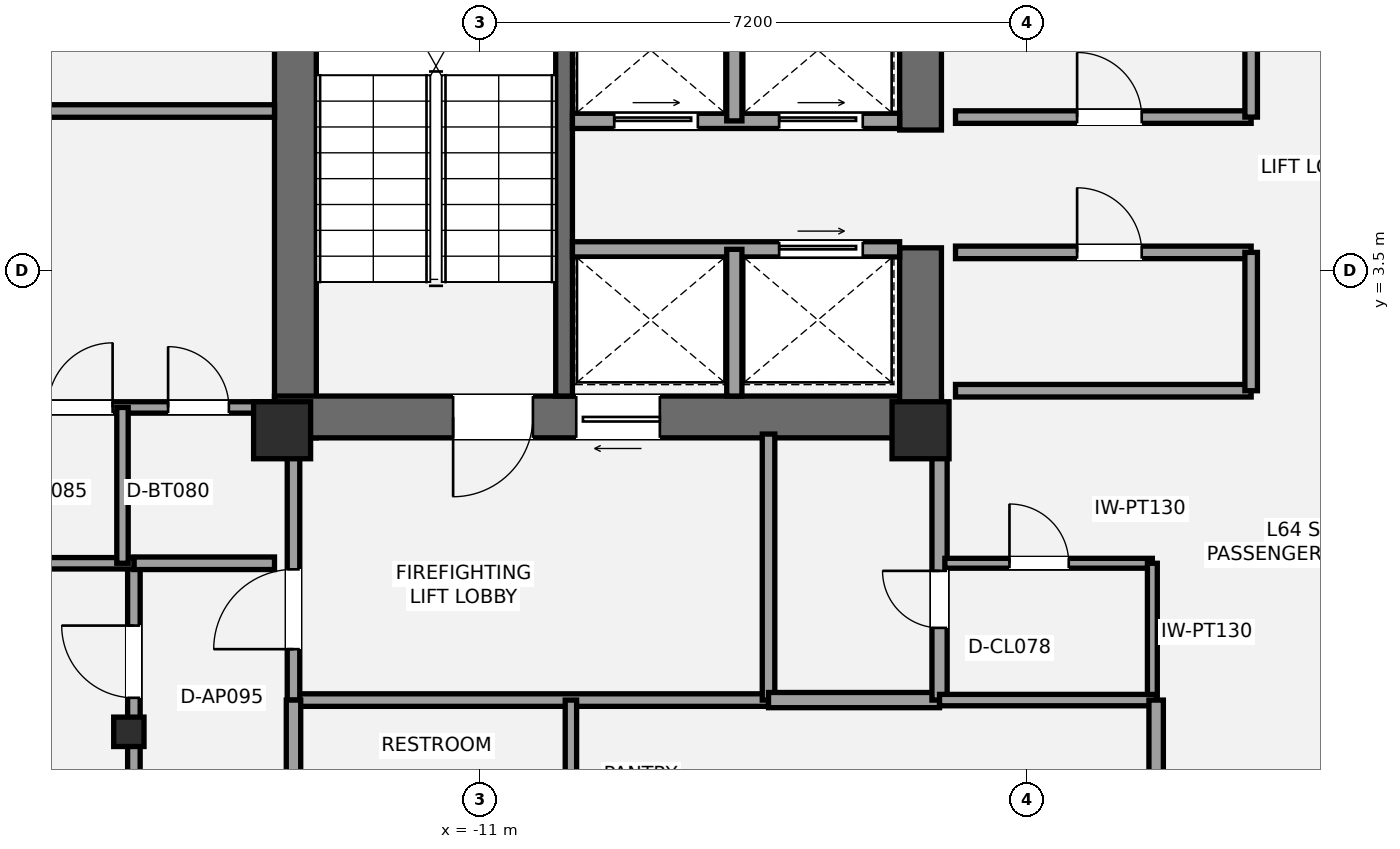
"""IFC4 building model, lengths in metres.
Left out: names, types, materials, properties, quantities, classifications, styles, units other than length and angle.
Written with IfcOpenShell. Run it as: python <this file> out.ifc"""

import sys

from ifc_helpers import new_model, si_unit, direction, frame, frame_2d, origin, origin_2d, place, context, subcontext, project, spatial, rectangle, i_section, extrude, element, fill, save


model = new_model("IFC4")
c1 = context("Model", 3, precision=1e-05, world=origin(), true_north=direction((0.0, 1.0)))
c2 = subcontext(c1, "Body", "Model", "MODEL_VIEW")
j1 = project(units=[si_unit("LENGTHUNIT", "METRE"), si_unit("PLANEANGLEUNIT", "RADIAN")], contexts=[c1])
p1 = place(None, origin())
s1 = spatial("IfcSite", under=j1, at=p1, CompositionType="ELEMENT")
p2 = place(p1, origin())
s2 = spatial("IfcBuilding", under=s1, at=p2, CompositionType="ELEMENT")
p3 = place(p2, frame((0.0, 0.0, 228.9)))
s3 = spatial("IfcBuildingStorey", under=s2, at=p3, CompositionType="ELEMENT", Elevation=228.9)
p4 = place(p3, frame((-13.425, 1.3, 0.0), z_axis=(0.0, 0.0, 1.0), x_axis=(0.0, 1.0, 0.0)))
e1 = element("IfcWall", 1, at=p4, inside=s3, PredefinedType="SHEAR", context=c2, shape_type="SweptSolid", body=[
    extrude(rectangle(XDim=8.25, YDim=0.55, at=frame_2d((4.125, 0.0))), origin(), (0.0, 0.0, 1.0), 3.15),
])
p5 = place(p3, frame((-4.925, 1.575, 0.0), z_axis=(0.0, 0.0, 1.0), x_axis=(-1.0, 0.0, 0.0)))
e2 = element("IfcWall", 2, at=p5, inside=s3, PredefinedType="SHEAR", context=c2, shape_type="SweptSolid", body=[
    extrude(rectangle(XDim=8.775, YDim=0.55, at=frame_2d((4.387, 0.0))), origin(), (0.0, 0.0, 1.0), 3.15),
])
p6 = place(p5, frame((5.375, 0.0, 0.0)))
e3 = element("IfcOpeningElement", 3, at=p6, cuts=e2, PredefinedType="OPENING", context=c2, shape_type="SweptSolid", body=[
    extrude(rectangle(XDim=1.05, YDim=2.15, at=frame_2d((0.525, 1.075))), frame((0.0, 0.285, 0.0), z_axis=(0.0, -1.0, 0.0), x_axis=(1.0, 0.0, 0.0)), (0.0, 0.0, 1.0), 0.57),
])
p7 = place(p5, frame((3.705, 0.0, 0.0)))
e4 = element("IfcOpeningElement", 4, at=p7, cuts=e2, PredefinedType="OPENING", context=c2, shape_type="SweptSolid", body=[
    extrude(rectangle(XDim=1.1, YDim=2.2, at=frame_2d((0.55, 1.1))), frame((0.0, 0.285, 0.0), z_axis=(0.0, -1.0, 0.0), x_axis=(1.0, 0.0, 0.0)), (0.0, 0.0, 1.0), 0.57),
])
p8 = place(p3, frame((-5.2, 1.3, 0.0), z_axis=(0.0, 0.0, 1.0), x_axis=(0.0, 1.0, 0.0)))
e5 = element("IfcWall", 5, at=p8, inside=s3, PredefinedType="SHEAR", context=c2, shape_type="SweptSolid", body=[
    extrude(rectangle(XDim=2.5, YDim=0.55, at=frame_2d((1.25, 0.0))), origin(), (0.0, 0.0, 1.0), 3.15),
])
p9 = place(p3, frame((-5.2, 5.35, 0.0), z_axis=(0.0, 0.0, 1.0), x_axis=(0.0, 1.0, 0.0)))
e6 = element("IfcWall", 6, at=p9, inside=s3, PredefinedType="SHEAR", context=c2, shape_type="SweptSolid", body=[
    extrude(rectangle(XDim=2.0, YDim=0.55, at=frame_2d((1.0, 0.0))), origin(), (0.0, 0.0, 1.0), 3.15),
])
p10 = place(p3, frame((-9.89, 1.85, 0.0), z_axis=(0.0, 0.0, 1.0), x_axis=(0.0, 1.0, 0.0)))
e7 = element("IfcWall", 7, at=p10, inside=s3, PredefinedType="SHEAR", context=c2, shape_type="SweptSolid", body=[
    extrude(rectangle(XDim=7.15, YDim=0.22, at=frame_2d((3.575, 0.0))), origin(), (0.0, 0.0, 1.0), 3.15),
])
for number, where, z_axis, x_axis in (
    (8, (-13.6, 1.4, 0.0), (0.0, 0.0, 1.0), (1.0, 0.0, 0.0)),
    (9, (-5.2, 1.4, 0.0), (0.0, 0.0, 1.0), (1.0, 0.0, 0.0)),
):
    element("IfcColumn", number, at=place(p3, frame(where, z_axis=z_axis, x_axis=x_axis)), inside=s3, PredefinedType="PILASTER", context=c2, shape_type="SweptSolid", body=[
        extrude(rectangle(XDim=0.75, YDim=0.75, at=origin_2d()), origin(), (0.0, 0.0, 1.0), 3.15),
    ])
p11 = place(p3, frame((-15.616, -2.567, 0.0), z_axis=(0.0, 0.0, 1.0), x_axis=(1.0, 0.0, 0.0)))
e10 = element("IfcColumn", 10, at=p11, inside=s3, PredefinedType="COLUMN", context=c2, shape_type="SweptSolid", body=[
    extrude(i_section(OverallWidth=0.399, OverallDepth=0.387, WebThickness=0.021, FlangeThickness=0.033, at=origin_2d()), origin(), (0.0, 0.0, 1.0), 3.15),
])
p12 = place(p3, frame((-13.45, -2.15, 0.0), z_axis=(0.0, 0.0, 1.0), x_axis=(1.0, 0.0, 0.0)))
e11 = element("IfcWall", 11, at=p12, inside=s3, PredefinedType="PARTITIONING", context=c2, shape_type="SweptSolid", body=[
    extrude(rectangle(XDim=6.25, YDim=0.165, at=frame_2d((3.125, 0.0))), origin(), (0.0, 0.0, 1.0), 2.423),
])
p13 = place(p3, frame((-13.45, -2.15, 0.0), z_axis=(0.0, 0.0, 1.0), x_axis=(0.0, 1.0, 0.0)))
e12 = element("IfcWall", 12, at=p13, inside=s3, PredefinedType="PARTITIONING", context=c2, shape_type="SweptSolid", body=[
    extrude(rectangle(XDim=3.5, YDim=0.165, at=frame_2d((1.75, 0.0))), origin(), (0.0, 0.0, 1.0), 2.423),
])
p14 = place(p13, frame((0.67, 0.0, 0.0)))
e13 = element("IfcOpeningElement", 13, at=p14, cuts=e12, PredefinedType="OPENING", context=c2, shape_type="SweptSolid", body=[
    extrude(rectangle(XDim=1.05, YDim=2.15, at=frame_2d((0.525, 1.075))), frame((0.0, 0.093, 0.0), z_axis=(0.0, -1.0, 0.0), x_axis=(1.0, 0.0, 0.0)), (0.0, 0.0, 1.0), 0.185),
])
p15 = place(p3, frame((-7.2, -2.15, 0.0), z_axis=(0.0, 0.0, 1.0), x_axis=(0.0, 1.0, 0.0)))
e14 = element("IfcWall", 14, at=p15, inside=s3, PredefinedType="PARTITIONING", context=c2, shape_type="SweptSolid", body=[
    extrude(rectangle(XDim=3.5, YDim=0.165, at=frame_2d((1.75, 0.0))), origin(), (0.0, 0.0, 1.0), 2.423),
])
p16 = place(p3, frame((-7.2, -2.15, 0.0), z_axis=(0.0, 0.0, 1.0), x_axis=(1.0, 0.0, 0.0)))
e15 = element("IfcWall", 15, at=p16, inside=s3, PredefinedType="SOLIDWALL", context=c2, shape_type="SweptSolid", body=[
    extrude(rectangle(XDim=2.25, YDim=0.2, at=frame_2d((1.125, 0.0))), origin(), (0.0, 0.0, 1.0), 2.97),
])
p17 = place(p3, frame((-4.95, -2.15, 0.0), z_axis=(0.0, 0.0, 1.0), x_axis=(0.0, 1.0, 0.0)))
e16 = element("IfcWall", 16, at=p17, inside=s3, PredefinedType="SOLIDWALL", context=c2, shape_type="SweptSolid", body=[
    extrude(rectangle(XDim=3.5, YDim=0.2, at=frame_2d((1.75, 0.0))), origin(), (0.0, 0.0, 1.0), 2.423),
])
p18 = place(p17, frame((0.95, 0.0, 0.0)))
e17 = element("IfcOpeningElement", 17, at=p18, cuts=e16, PredefinedType="OPENING", context=c2, shape_type="SweptSolid", body=[
    extrude(rectangle(XDim=0.75, YDim=2.1, at=frame_2d((0.375, 1.05))), frame((0.0, 0.11, 0.0), z_axis=(0.0, -1.0, 0.0), x_axis=(1.0, 0.0, 0.0)), (0.0, 0.0, 1.0), 0.22),
])
p19 = place(p3, frame((-4.88, -0.35, 0.0), z_axis=(0.0, 0.0, 1.0), x_axis=(1.0, 0.0, 0.0)))
e18 = element("IfcWall", 18, at=p19, inside=s3, PredefinedType="PARTITIONING", context=c2, shape_type="SweptSolid", body=[
    extrude(rectangle(XDim=2.73, YDim=0.13, at=frame_2d((1.365, 0.0))), origin(), (0.0, 0.0, 1.0), 2.97),
])
p20 = place(p19, frame((0.85, 0.0, 0.0)))
e19 = element("IfcOpeningElement", 19, at=p20, cuts=e18, PredefinedType="OPENING", context=c2, shape_type="SweptSolid", body=[
    extrude(rectangle(XDim=0.78, YDim=2.1, at=frame_2d((0.39, 1.05))), frame((0.0, 0.075, 0.0), z_axis=(0.0, -1.0, 0.0), x_axis=(1.0, 0.0, 0.0)), (0.0, 0.0, 1.0), 0.15),
])
p21 = place(p3, frame((-2.15, -2.15, 0.0), z_axis=(0.0, 0.0, 1.0), x_axis=(0.0, 1.0, 0.0)))
e20 = element("IfcWall", 20, at=p21, inside=s3, PredefinedType="PARTITIONING", context=c2, shape_type="SweptSolid", body=[
    extrude(rectangle(XDim=1.8, YDim=0.13, at=frame_2d((0.9, 0.0))), origin(), (0.0, 0.0, 1.0), 2.97),
])
p22 = place(p3, frame((-9.78, 3.78, 0.0), z_axis=(0.0, 0.0, 1.0), x_axis=(1.0, 0.0, 0.0)))
e21 = element("IfcWall", 21, at=p22, inside=s3, PredefinedType="SOLIDWALL", context=c2, shape_type="SweptSolid", body=[
    extrude(rectangle(XDim=4.305, YDim=0.2, at=frame_2d((2.152, 0.0))), origin(), (0.0, 0.0, 1.0), 2.97),
])
p23 = place(p22, frame((2.72, 0.0, 0.0)))
e22 = element("IfcOpeningElement", 22, at=p23, cuts=e21, PredefinedType="OPENING", context=c2, shape_type="SweptSolid", body=[
    extrude(rectangle(XDim=1.1, YDim=2.2, at=frame_2d((0.55, 1.1))), frame((0.0, 0.11, 0.0), z_axis=(0.0, -1.0, 0.0), x_axis=(1.0, 0.0, 0.0)), (0.0, 0.0, 1.0), 0.22),
])
p24 = place(p3, frame((-7.65, 1.85, 0.0), z_axis=(0.0, 0.0, 1.0), x_axis=(0.0, 1.0, 0.0)))
e23 = element("IfcWall", 23, at=p24, inside=s3, PredefinedType="SOLIDWALL", context=c2, shape_type="SweptSolid", body=[
    extrude(rectangle(XDim=1.93, YDim=0.2, at=frame_2d((0.965, 0.0))), origin(), (0.0, 0.0, 1.0), 2.97),
])
p25 = place(p3, frame((-9.78, 5.47, 0.0), z_axis=(0.0, 0.0, 1.0), x_axis=(1.0, 0.0, 0.0)))
e24 = element("IfcWall", 24, at=p25, inside=s3, PredefinedType="SOLIDWALL", context=c2, shape_type="SweptSolid", body=[
    extrude(rectangle(XDim=4.305, YDim=0.2, at=frame_2d((2.152, 0.0))), origin(), (0.0, 0.0, 1.0), 2.97),
])
p26 = place(p25, frame((0.55, 0.0, 0.0)))
e25 = element("IfcOpeningElement", 25, at=p26, cuts=e24, PredefinedType="OPENING", context=c2, shape_type="SweptSolid", body=[
    extrude(rectangle(XDim=1.1, YDim=2.2, at=frame_2d((0.55, 1.1))), frame((0.0, 0.11, 0.0), z_axis=(0.0, -1.0, 0.0), x_axis=(1.0, 0.0, 0.0)), (0.0, 0.0, 1.0), 0.22),
])
p27 = place(p25, frame((2.72, 0.0, 0.0)))
e26 = element("IfcOpeningElement", 26, at=p27, cuts=e24, PredefinedType="OPENING", context=c2, shape_type="SweptSolid", body=[
    extrude(rectangle(XDim=1.1, YDim=2.2, at=frame_2d((0.55, 1.1))), frame((0.0, 0.11, 0.0), z_axis=(0.0, -1.0, 0.0), x_axis=(1.0, 0.0, 0.0)), (0.0, 0.0, 1.0), 0.22),
])
p28 = place(p3, frame((-7.65, 5.47, 0.0), z_axis=(0.0, 0.0, 1.0), x_axis=(0.0, 1.0, 0.0)))
e27 = element("IfcWall", 27, at=p28, inside=s3, PredefinedType="SOLIDWALL", context=c2, shape_type="SweptSolid", body=[
    extrude(rectangle(XDim=1.86, YDim=0.2, at=frame_2d((0.93, 0.0))), origin(), (0.0, 0.0, 1.0), 2.97),
])
p29 = place(p3, frame((-4.74, 1.92, 0.0), z_axis=(0.0, 0.0, 1.0), x_axis=(1.0, 0.0, 0.0)))
e28 = element("IfcWall", 28, at=p29, inside=s3, PredefinedType="PARTITIONING", context=c2, shape_type="SweptSolid", body=[
    extrude(rectangle(XDim=3.89, YDim=0.165, at=frame_2d((1.945, 0.0))), origin(), (0.0, 0.0, 1.0), 2.11),
])
p30 = place(p3, frame((-4.74, 3.74, 0.0), z_axis=(0.0, 0.0, 1.0), x_axis=(1.0, 0.0, 0.0)))
e29 = element("IfcWall", 29, at=p30, inside=s3, PredefinedType="PARTITIONING", context=c2, shape_type="SweptSolid", body=[
    extrude(rectangle(XDim=3.89, YDim=0.165, at=frame_2d((1.945, 0.0))), origin(), (0.0, 0.0, 1.0), 2.97),
])
p31 = place(p30, frame((1.6, 0.0, 0.0)))
e30 = element("IfcOpeningElement", 30, at=p31, cuts=e29, PredefinedType="OPENING", context=c2, shape_type="SweptSolid", body=[
    extrude(rectangle(XDim=0.85, YDim=2.1, at=frame_2d((0.425, 1.05))), frame((0.0, 0.093, 0.0), z_axis=(0.0, -1.0, 0.0), x_axis=(1.0, 0.0, 0.0)), (0.0, 0.0, 1.0), 0.185),
])
p32 = place(p3, frame((-0.85, 1.92, 0.0), z_axis=(0.0, 0.0, 1.0), x_axis=(0.0, 1.0, 0.0)))
e31 = element("IfcWall", 31, at=p32, inside=s3, PredefinedType="PARTITIONING", context=c2, shape_type="SweptSolid", body=[
    extrude(rectangle(XDim=1.82, YDim=0.165, at=frame_2d((0.91, 0.0))), origin(), (0.0, 0.0, 1.0), 2.97),
])
p33 = place(p3, frame((-4.74, 5.52, 0.0), z_axis=(0.0, 0.0, 1.0), x_axis=(1.0, 0.0, 0.0)))
e32 = element("IfcWall", 32, at=p33, inside=s3, PredefinedType="PARTITIONING", context=c2, shape_type="SweptSolid", body=[
    extrude(rectangle(XDim=3.89, YDim=0.165, at=frame_2d((1.945, 0.0))), origin(), (0.0, 0.0, 1.0), 2.97),
])
p34 = place(p33, frame((1.6, 0.0, 0.0)))
e33 = element("IfcOpeningElement", 33, at=p34, cuts=e32, PredefinedType="OPENING", context=c2, shape_type="SweptSolid", body=[
    extrude(rectangle(XDim=0.85, YDim=2.1, at=frame_2d((0.425, 1.05))), frame((0.0, 0.093, 0.0), z_axis=(0.0, -1.0, 0.0), x_axis=(1.0, 0.0, 0.0)), (0.0, 0.0, 1.0), 0.185),
])
p35 = place(p3, frame((-0.85, 5.52, 0.0), z_axis=(0.0, 0.0, 1.0), x_axis=(0.0, 1.0, 0.0)))
e34 = element("IfcWall", 34, at=p35, inside=s3, PredefinedType="PARTITIONING", context=c2, shape_type="SweptSolid", body=[
    extrude(rectangle(XDim=1.81, YDim=0.165, at=frame_2d((0.905, 0.0))), origin(), (0.0, 0.0, 1.0), 2.97),
])
p36 = place(p3, frame((-4.95, -2.15, 0.0), z_axis=(0.0, 0.0, 1.0), x_axis=(1.0, 0.0, 0.0)))
e35 = element("IfcWall", 35, at=p36, inside=s3, PredefinedType="PLUMBINGWALL", context=c2, shape_type="SweptSolid", body=[
    extrude(rectangle(XDim=2.85, YDim=0.15, at=frame_2d((1.425, 0.0))), origin(), (0.0, 0.0, 1.0), 2.423),
])
for number, where, z_axis, x_axis in (
    (36, (-13.45, -4.05, 0.0), (0.0, 0.0, 1.0), (0.0, 1.0, 0.0)),
    (37, (-2.1, -4.05, 0.0), (0.0, 0.0, 1.0), (0.0, 1.0, 0.0)),
):
    element("IfcWall", number, at=place(p3, frame(where, z_axis=z_axis, x_axis=x_axis)), inside=s3, PredefinedType="PLUMBINGWALL", context=c2, shape_type="SweptSolid", body=[
        extrude(rectangle(XDim=1.9, YDim=0.19, at=frame_2d((0.95, 0.0))), origin(), (0.0, 0.0, 1.0), 2.423),
    ])
p37 = place(p3, frame((-9.8, -4.05, 0.0), z_axis=(0.0, 0.0, 1.0), x_axis=(0.0, 1.0, 0.0)))
e38 = element("IfcWall", 38, at=p37, inside=s3, PredefinedType="PLUMBINGWALL", context=c2, shape_type="SweptSolid", body=[
    extrude(rectangle(XDim=1.9, YDim=0.15, at=frame_2d((0.95, 0.0))), origin(), (0.0, 0.0, 1.0), 2.97),
])
p38 = place(p3, frame((-15.55, -3.95, 0.0), z_axis=(0.0, 0.0, 1.0), x_axis=(0.0, 1.0, 0.0)))
e39 = element("IfcWall", 39, at=p38, inside=s3, PredefinedType="PARTITIONING", context=c2, shape_type="SweptSolid", body=[
    extrude(rectangle(XDim=3.6, YDim=0.165, at=frame_2d((1.8, 0.0))), origin(), (0.0, 0.0, 1.0), 2.357),
])
p39 = place(p38, frame((1.83, 0.0, 0.0)))
e40 = element("IfcOpeningElement", 40, at=p39, cuts=e39, PredefinedType="OPENING", context=c2, shape_type="SweptSolid", body=[
    extrude(rectangle(XDim=0.95, YDim=2.15, at=frame_2d((0.475, 1.075))), frame((0.0, 0.093, 0.0), z_axis=(0.0, -1.0, 0.0), x_axis=(1.0, 0.0, 0.0)), (0.0, 0.0, 1.0), 0.185),
])
p40 = place(p3, frame((-15.55, -0.35, 0.0), z_axis=(0.0, 0.0, 1.0), x_axis=(1.0, 0.0, 0.0)))
e41 = element("IfcWall", 41, at=p40, inside=s3, PredefinedType="PARTITIONING", context=c2, shape_type="SweptSolid", body=[
    extrude(rectangle(XDim=1.85, YDim=0.165, at=frame_2d((0.925, 0.0))), origin(), (0.0, 0.0, 1.0), 2.97),
])
p41 = place(p3, frame((-20.312, 5.6, 0.0), z_axis=(0.0, 0.0, 1.0), x_axis=(1.0, 0.0, 0.0)))
e42 = element("IfcWall", 42, at=p41, inside=s3, PredefinedType="PARTITIONING", context=c2, shape_type="SweptSolid", body=[
    extrude(rectangle(XDim=6.612, YDim=0.165, at=frame_2d((3.306, 0.0))), origin(), (0.0, 0.0, 1.0), 2.423),
])
p42 = place(p41, frame((2.412, 0.0, 0.0)))
e43 = element("IfcOpeningElement", 43, at=p42, cuts=e42, PredefinedType="OPENING", context=c2, shape_type="SweptSolid", body=[
    extrude(rectangle(XDim=0.85, YDim=2.1, at=frame_2d((0.425, 1.05))), frame((0.0, 0.093, 0.0), z_axis=(0.0, -1.0, 0.0), x_axis=(1.0, 0.0, 0.0)), (0.0, 0.0, 1.0), 0.185),
])
p43 = place(p3, frame((-17.95, 1.7, 0.0), z_axis=(0.0, 0.0, 1.0), x_axis=(1.0, 0.0, 0.0)))
e44 = element("IfcWall", 44, at=p43, inside=s3, PredefinedType="PLUMBINGWALL", context=c2, shape_type="SweptSolid", body=[
    extrude(rectangle(XDim=4.25, YDim=0.15, at=frame_2d((2.125, 0.0))), origin(), (0.0, 0.0, 1.0), 2.423),
])
p44 = place(p43, frame((2.85, 0.0, 0.0)))
e45 = element("IfcOpeningElement", 45, at=p44, cuts=e44, PredefinedType="OPENING", context=c2, shape_type="SweptSolid", body=[
    extrude(rectangle(XDim=0.8, YDim=2.1, at=frame_2d((0.4, 1.05))), frame((0.0, 0.085, 0.0), z_axis=(0.0, -1.0, 0.0), x_axis=(1.0, 0.0, 0.0)), (0.0, 0.0, 1.0), 0.17),
])
p45 = place(p43, frame((1.27, 0.0, 0.0)))
e46 = element("IfcOpeningElement", 46, at=p45, cuts=e44, PredefinedType="OPENING", context=c2, shape_type="SweptSolid", body=[
    extrude(rectangle(XDim=0.85, YDim=2.1, at=frame_2d((0.425, 1.05))), frame((0.0, 0.085, 0.0), z_axis=(0.0, -1.0, 0.0), x_axis=(1.0, 0.0, 0.0)), (0.0, 0.0, 1.0), 0.17),
])
p46 = place(p3, frame((-17.95, -0.35, 0.0), z_axis=(0.0, 0.0, 1.0), x_axis=(1.0, 0.0, 0.0)))
e47 = element("IfcWall", 47, at=p46, inside=s3, PredefinedType="PLUMBINGWALL", context=c2, shape_type="SweptSolid", body=[
    extrude(rectangle(XDim=2.4, YDim=0.15, at=frame_2d((1.2, 0.0))), origin(), (0.0, 0.0, 1.0), 2.423),
])
p47 = place(p3, frame((-15.7, -0.35, 0.0), z_axis=(0.0, 0.0, 1.0), x_axis=(0.0, 1.0, 0.0)))
e48 = element("IfcWall", 48, at=p47, inside=s3, PredefinedType="PLUMBINGWALL", context=c2, shape_type="SweptSolid", body=[
    extrude(rectangle(XDim=2.05, YDim=0.15, at=frame_2d((1.025, 0.0))), origin(), (0.0, 0.0, 1.0), 2.423),
])
p48 = place(p6, origin())
e49 = element("IfcDoor", 49, at=p48, inside=s3, OperationType="SINGLE_SWING_RIGHT", PredefinedType="DOOR", context=c2, shape_type="SweptSolid", body=[
    extrude(rectangle(XDim=1.05, YDim=2.15, at=frame_2d((0.525, 1.075))), frame((0.0, 0.025, 0.0), z_axis=(0.0, -1.0, 0.0), x_axis=(1.0, 0.0, 0.0)), (0.0, 0.0, 1.0), 0.05),
])
fill(e3, e49)
p49 = place(p14, origin())
e50 = element("IfcDoor", 50, at=p49, inside=s3, OperationType="SINGLE_SWING_LEFT", PredefinedType="DOOR", context=c2, shape_type="SweptSolid", body=[
    extrude(rectangle(XDim=1.05, YDim=2.15, at=frame_2d((0.525, 1.075))), frame((0.0, 0.025, 0.0), z_axis=(0.0, -1.0, 0.0), x_axis=(1.0, 0.0, 0.0)), (0.0, 0.0, 1.0), 0.05),
])
fill(e13, e50)
p50 = place(p18, origin())
e51 = element("IfcDoor", 51, at=p50, inside=s3, OperationType="SINGLE_SWING_RIGHT", PredefinedType="DOOR", context=c2, shape_type="SweptSolid", body=[
    extrude(rectangle(XDim=0.75, YDim=2.1, at=frame_2d((0.375, 1.05))), frame((0.0, 0.025, 0.0), z_axis=(0.0, -1.0, 0.0), x_axis=(1.0, 0.0, 0.0)), (0.0, 0.0, 1.0), 0.05),
])
fill(e17, e51)
p51 = place(p20, origin())
e52 = element("IfcDoor", 52, at=p51, inside=s3, OperationType="SINGLE_SWING_LEFT", PredefinedType="DOOR", context=c2, shape_type="SweptSolid", body=[
    extrude(rectangle(XDim=0.78, YDim=2.1, at=frame_2d((0.39, 1.05))), frame((0.0, 0.025, 0.0), z_axis=(0.0, -1.0, 0.0), x_axis=(1.0, 0.0, 0.0)), (0.0, 0.0, 1.0), 0.05),
])
fill(e19, e52)
p52 = place(p7, origin())
e53 = element("IfcDoor", 53, at=p52, inside=s3, OperationType="SLIDING_TO_LEFT", PredefinedType="DOOR", context=c2, shape_type="SweptSolid", body=[
    extrude(rectangle(XDim=1.1, YDim=2.2, at=frame_2d((0.55, 1.1))), frame((0.0, 0.025, 0.0), z_axis=(0.0, -1.0, 0.0), x_axis=(1.0, 0.0, 0.0)), (0.0, 0.0, 1.0), 0.05),
])
fill(e4, e53)
p53 = place(p26, origin())
e54 = element("IfcDoor", 54, at=p53, inside=s3, OperationType="SLIDING_TO_LEFT", PredefinedType="DOOR", context=c2, shape_type="SweptSolid", body=[
    extrude(rectangle(XDim=1.1, YDim=2.2, at=frame_2d((0.55, 1.1))), frame((0.0, 0.025, 0.0), z_axis=(0.0, -1.0, 0.0), x_axis=(1.0, 0.0, 0.0)), (0.0, 0.0, 1.0), 0.05),
])
fill(e25, e54)
p54 = place(p27, origin())
e55 = element("IfcDoor", 55, at=p54, inside=s3, OperationType="SLIDING_TO_LEFT", PredefinedType="DOOR", context=c2, shape_type="SweptSolid", body=[
    extrude(rectangle(XDim=1.1, YDim=2.2, at=frame_2d((0.55, 1.1))), frame((0.0, 0.025, 0.0), z_axis=(0.0, -1.0, 0.0), x_axis=(1.0, 0.0, 0.0)), (0.0, 0.0, 1.0), 0.05),
])
fill(e26, e55)
p55 = place(p23, origin())
e56 = element("IfcDoor", 56, at=p55, inside=s3, OperationType="SLIDING_TO_LEFT", PredefinedType="DOOR", context=c2, shape_type="SweptSolid", body=[
    extrude(rectangle(XDim=1.1, YDim=2.2, at=frame_2d((0.55, 1.1))), frame((0.0, 0.025, 0.0), z_axis=(0.0, -1.0, 0.0), x_axis=(1.0, 0.0, 0.0)), (0.0, 0.0, 1.0), 0.05),
])
fill(e22, e56)
p56 = place(p31, origin())
e57 = element("IfcDoor", 57, at=p56, inside=s3, OperationType="SINGLE_SWING_LEFT", PredefinedType="DOOR", context=c2, shape_type="SweptSolid", body=[
    extrude(rectangle(XDim=0.85, YDim=2.1, at=frame_2d((0.425, 1.05))), frame((0.0, 0.025, 0.0), z_axis=(0.0, -1.0, 0.0), x_axis=(1.0, 0.0, 0.0)), (0.0, 0.0, 1.0), 0.05),
])
fill(e30, e57)
p57 = place(p34, origin())
e58 = element("IfcDoor", 58, at=p57, inside=s3, OperationType="SINGLE_SWING_LEFT", PredefinedType="DOOR", context=c2, shape_type="SweptSolid", body=[
    extrude(rectangle(XDim=0.85, YDim=2.1, at=frame_2d((0.425, 1.05))), frame((0.0, 0.025, 0.0), z_axis=(0.0, -1.0, 0.0), x_axis=(1.0, 0.0, 0.0)), (0.0, 0.0, 1.0), 0.05),
])
fill(e33, e58)
p58 = place(p39, origin())
e59 = element("IfcDoor", 59, at=p58, inside=s3, OperationType="SINGLE_SWING_RIGHT", PredefinedType="DOOR", context=c2, shape_type="SweptSolid", body=[
    extrude(rectangle(XDim=0.95, YDim=2.15, at=frame_2d((0.475, 1.075))), frame((0.0, 0.025, 0.0), z_axis=(0.0, -1.0, 0.0), x_axis=(1.0, 0.0, 0.0)), (0.0, 0.0, 1.0), 0.05),
])
fill(e40, e59)
p59 = place(p44, origin())
e60 = element("IfcDoor", 60, at=p59, inside=s3, OperationType="SINGLE_SWING_LEFT", PredefinedType="DOOR", context=c2, shape_type="SweptSolid", body=[
    extrude(rectangle(XDim=0.8, YDim=2.1, at=frame_2d((0.4, 1.05))), frame((0.0, 0.025, 0.0), z_axis=(0.0, -1.0, 0.0), x_axis=(1.0, 0.0, 0.0)), (0.0, 0.0, 1.0), 0.05),
])
fill(e45, e60)
p60 = place(p45, origin())
e61 = element("IfcDoor", 61, at=p60, inside=s3, OperationType="SINGLE_SWING_RIGHT", PredefinedType="DOOR", context=c2, shape_type="SweptSolid", body=[
    extrude(rectangle(XDim=0.85, YDim=2.1, at=frame_2d((0.425, 1.05))), frame((0.0, 0.025, 0.0), z_axis=(0.0, -1.0, 0.0), x_axis=(1.0, 0.0, 0.0)), (0.0, 0.0, 1.0), 0.05),
])
fill(e46, e61)
save(model, sys.argv[1])
